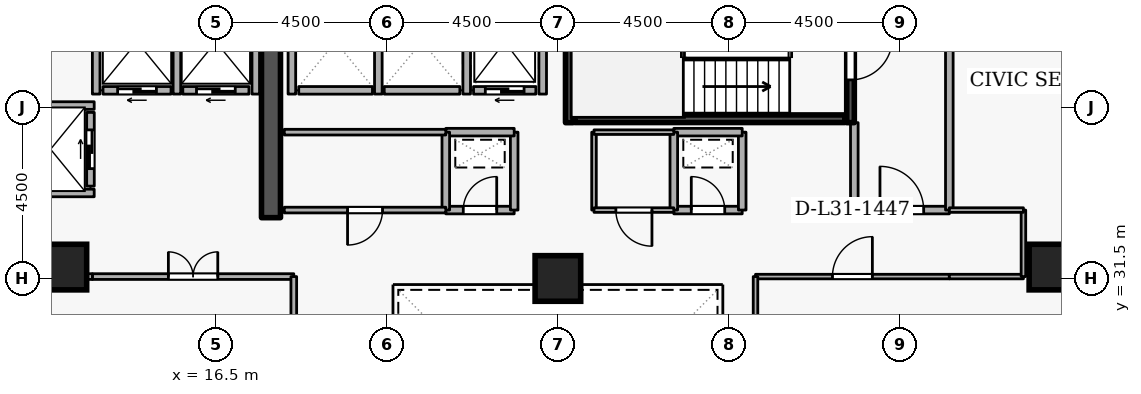
"""IFC4 building model, lengths in metres.
Left out: names, types, materials, properties, quantities, classifications, styles, units other than length and angle.
Written with IfcOpenShell. Run it as: python <this file> out.ifc"""

import sys

from ifc_helpers import new_model, si_unit, direction, frame, frame_2d, origin, origin_2d, place, context, subcontext, project, spatial, rectangle, extrude, element, fill, save


model = new_model("IFC4")
c1 = context("Model", 3, precision=1e-05, world=origin(), true_north=direction((0.0, 1.0)))
c2 = subcontext(c1, "Body", "Model", "MODEL_VIEW")
j1 = project(units=[si_unit("LENGTHUNIT", "METRE"), si_unit("PLANEANGLEUNIT", "RADIAN")], contexts=[c1])
p1 = place(None, origin())
s1 = spatial("IfcSite", under=j1, at=p1, CompositionType="ELEMENT")
p2 = place(p1, origin())
s2 = spatial("IfcBuilding", under=s1, at=p2, CompositionType="ELEMENT")
p3 = place(p2, frame((0.0, 0.0, 119.7)))
s3 = spatial("IfcBuildingStorey", under=s2, at=p3, CompositionType="ELEMENT", Elevation=119.7)
p4 = place(p3, frame((17.95, 33.1, 0.0), z_axis=(0.0, 0.0, 1.0), x_axis=(0.0, 1.0, 0.0)))
e1 = element("IfcWall", 1, at=p4, inside=s3, PredefinedType="SHEAR", context=c2, shape_type="SweptSolid", body=[
    extrude(rectangle(XDim=5.8, YDim=0.5, at=frame_2d((2.9, 0.0))), origin(), (0.0, 0.0, 1.0), 3.6),
])
for number, where, z_axis, x_axis in (
    (2, (12.5, 31.8, 0.0), (0.0, 0.0, 1.0), (1.0, 0.0, 0.0)),
    (3, (38.5, 31.8, 0.0), (0.0, 0.0, 1.0), (1.0, 0.0, 0.0)),
    (4, (25.5, 31.5, 0.0), (0.0, 0.0, 1.0), (1.0, 0.0, 0.0)),
):
    element("IfcColumn", number, at=place(p3, frame(where, z_axis=z_axis, x_axis=x_axis)), inside=s3, PredefinedType="COLUMN", context=c2, shape_type="SweptSolid", body=[
        extrude(rectangle(XDim=1.2, YDim=1.2, at=origin_2d()), origin(), (0.0, 0.0, 1.0), 3.6),
    ])
p5 = place(p3, frame((24.92, 36.45, 0.0), z_axis=(0.0, 0.0, 1.0), x_axis=(-1.0, 0.0, 0.0)))
e5 = element("IfcWall", 5, at=p5, inside=s3, PredefinedType="STANDARD", context=c2, shape_type="SweptSolid", body=[
    extrude(rectangle(XDim=1.64, YDim=0.2, at=frame_2d((0.82, 0.0))), origin(), (0.0, 0.0, 1.0), 3.32),
])
p6 = place(p5, frame((0.31, 0.0, 0.0)))
e6 = element("IfcOpeningElement", 6, at=p6, cuts=e5, PredefinedType="OPENING", context=c2, shape_type="SweptSolid", body=[
    extrude(rectangle(XDim=1.02, YDim=2.06, at=frame_2d((0.51, 1.03))), frame((0.0, 0.11, 0.0), z_axis=(0.0, -1.0, 0.0), x_axis=(1.0, 0.0, 0.0)), (0.0, 0.0, 1.0), 0.22),
])
p7 = place(p3, frame((22.92, 36.45, 0.0), z_axis=(0.0, 0.0, 1.0), x_axis=(-1.0, 0.0, 0.0)))
e7 = element("IfcWall", 7, at=p7, inside=s3, PredefinedType="STANDARD", context=c2, shape_type="SweptSolid", body=[
    extrude(rectangle(XDim=1.99, YDim=0.2, at=frame_2d((0.995, 0.0))), origin(), (0.0, 0.0, 1.0), 3.32),
])
p8 = place(p3, frame((20.62, 36.45, 0.0), z_axis=(0.0, 0.0, 1.0), x_axis=(-1.0, 0.0, 0.0)))
e8 = element("IfcWall", 8, at=p8, inside=s3, PredefinedType="STANDARD", context=c2, shape_type="SweptSolid", body=[
    extrude(rectangle(XDim=1.94, YDim=0.2, at=frame_2d((0.97, 0.0))), origin(), (0.0, 0.0, 1.0), 3.32),
])
p9 = place(p3, frame((17.37, 36.45, 0.0), z_axis=(0.0, 0.0, 1.0), x_axis=(-1.0, 0.0, 0.0)))
e9 = element("IfcWall", 9, at=p9, inside=s3, PredefinedType="STANDARD", context=c2, shape_type="SweptSolid", body=[
    extrude(rectangle(XDim=1.74, YDim=0.2, at=frame_2d((0.87, 0.0))), origin(), (0.0, 0.0, 1.0), 3.32),
])
p10 = place(p9, frame((0.36, 0.0, 0.0)))
e10 = element("IfcOpeningElement", 10, at=p10, cuts=e9, PredefinedType="OPENING", context=c2, shape_type="SweptSolid", body=[
    extrude(rectangle(XDim=1.02, YDim=2.06, at=frame_2d((0.51, 1.03))), frame((0.0, 0.11, 0.0), z_axis=(0.0, -1.0, 0.0), x_axis=(1.0, 0.0, 0.0)), (0.0, 0.0, 1.0), 0.22),
])
p11 = place(p3, frame((15.32, 36.45, 0.0), z_axis=(0.0, 0.0, 1.0), x_axis=(-1.0, 0.0, 0.0)))
e11 = element("IfcWall", 11, at=p11, inside=s3, PredefinedType="STANDARD", context=c2, shape_type="SweptSolid", body=[
    extrude(rectangle(XDim=1.79, YDim=0.2, at=frame_2d((0.895, 0.0))), origin(), (0.0, 0.0, 1.0), 3.32),
])
p12 = place(p11, frame((0.385, 0.0, 0.0)))
e12 = element("IfcOpeningElement", 12, at=p12, cuts=e11, PredefinedType="OPENING", context=c2, shape_type="SweptSolid", body=[
    extrude(rectangle(XDim=1.02, YDim=2.06, at=frame_2d((0.51, 1.03))), frame((0.0, 0.11, 0.0), z_axis=(0.0, -1.0, 0.0), x_axis=(1.0, 0.0, 0.0)), (0.0, 0.0, 1.0), 0.22),
])
p13 = place(p3, frame((13.2, 33.93, 0.0), z_axis=(0.0, 0.0, 1.0), x_axis=(0.0, 1.0, 0.0)))
e13 = element("IfcWall", 13, at=p13, inside=s3, PredefinedType="STANDARD", context=c2, shape_type="SweptSolid", body=[
    extrude(rectangle(XDim=1.94, YDim=0.2, at=frame_2d((0.97, 0.0))), origin(), (0.0, 0.0, 1.0), 3.32),
])
p14 = place(p13, frame((0.46, 0.0, 0.0)))
e14 = element("IfcOpeningElement", 14, at=p14, cuts=e13, PredefinedType="OPENING", context=c2, shape_type="SweptSolid", body=[
    extrude(rectangle(XDim=1.02, YDim=2.06, at=frame_2d((0.51, 1.03))), frame((0.0, 0.11, 0.0), z_axis=(0.0, -1.0, 0.0), x_axis=(1.0, 0.0, 0.0)), (0.0, 0.0, 1.0), 0.22),
])
for number, where, z_axis, x_axis in (
    (15, (25.1, 36.352, 0.0), (0.0, 0.0, 1.0), (0.0, 1.0, 0.0)),
    (16, (23.1, 36.352, 0.0), (0.0, 0.0, 1.0), (0.0, 1.0, 0.0)),
    (17, (20.775, 36.352, 0.0), (0.0, 0.0, 1.0), (0.0, 1.0, 0.0)),
    (18, (18.5, 36.352, 0.0), (0.0, 0.0, 1.0), (0.0, 1.0, 0.0)),
):
    element("IfcWall", number, at=place(p3, frame(where, z_axis=z_axis, x_axis=x_axis)), inside=s3, PredefinedType="STANDARD", context=c2, shape_type="SweptSolid", body=[
        extrude(rectangle(XDim=2.536, YDim=0.2, at=frame_2d((1.268, 0.0))), origin(), (0.0, 0.0, 1.0), 3.32),
    ])
p15 = place(p3, frame((17.55, 36.352, 0.0), z_axis=(0.0, 0.0, 1.0), x_axis=(0.0, 1.0, 0.0)))
e19 = element("IfcWall", 19, at=p15, inside=s3, PredefinedType="STANDARD", context=c2, shape_type="SweptSolid", body=[
    extrude(rectangle(XDim=2.636, YDim=0.2, at=frame_2d((1.318, 0.0))), origin(), (0.0, 0.0, 1.0), 2.525),
])
for number, where, z_axis, x_axis in (
    (20, (15.475, 36.352, 0.0), (0.0, 0.0, 1.0), (0.0, 1.0, 0.0)),
    (21, (13.35, 36.352, 0.0), (0.0, 0.0, 1.0), (0.0, 1.0, 0.0)),
):
    element("IfcWall", number, at=place(p3, frame(where, z_axis=z_axis, x_axis=x_axis)), inside=s3, PredefinedType="STANDARD", context=c2, shape_type="SweptSolid", body=[
        extrude(rectangle(XDim=2.636, YDim=0.2, at=frame_2d((1.318, 0.0))), origin(), (0.0, 0.0, 1.0), 3.32),
    ])
for number, where, z_axis, x_axis in (
    (22, (11.002, 36.05, 0.0), (0.0, 0.0, 1.0), (1.0, 0.0, 0.0)),
    (23, (11.002, 33.75, 0.0), (0.0, 0.0, 1.0), (1.0, 0.0, 0.0)),
):
    element("IfcWall", number, at=place(p3, frame(where, z_axis=z_axis, x_axis=x_axis)), inside=s3, PredefinedType="STANDARD", context=c2, shape_type="SweptSolid", body=[
        extrude(rectangle(XDim=2.296, YDim=0.2, at=frame_2d((1.148, 0.0))), origin(), (0.0, 0.0, 1.0), 3.32),
    ])
p16 = place(p3, frame((33.2, 38.95, 0.0), z_axis=(0.0, 0.0, 1.0), x_axis=(0.0, -1.0, 0.0)))
e24 = element("IfcWall", 24, at=p16, inside=s3, PredefinedType="SHEAR", context=c2, shape_type="SweptSolid", body=[
    extrude(rectangle(XDim=3.35, YDim=0.2, at=frame_2d((1.675, 0.0))), origin(), (0.0, 0.0, 1.0), 3.6),
])
p17 = place(p16, frame((1.125, 0.0, 0.0)))
e25 = element("IfcOpeningElement", 25, at=p17, cuts=e24, PredefinedType="OPENING", context=c2, shape_type="SweptSolid", body=[
    extrude(rectangle(XDim=1.1, YDim=2.1, at=frame_2d((0.55, 1.05))), frame((0.0, 0.11, 0.0), z_axis=(0.0, -1.0, 0.0), x_axis=(1.0, 0.0, 0.0)), (0.0, 0.0, 1.0), 0.22),
])
p18 = place(p3, frame((25.8, 35.6, 0.0), z_axis=(0.0, 0.0, 1.0), x_axis=(0.0, 1.0, 0.0)))
e26 = element("IfcWall", 26, at=p18, inside=s3, PredefinedType="SHEAR", context=c2, shape_type="SweptSolid", body=[
    extrude(rectangle(XDim=3.35, YDim=0.2, at=frame_2d((1.675, 0.0))), origin(), (0.0, 0.0, 1.0), 3.6),
])
p19 = place(p3, frame((25.95, 35.703, 0.0), z_axis=(0.0, 0.0, 1.0), x_axis=(1.0, 0.0, 0.0)))
e27 = element("IfcWall", 27, at=p19, inside=s3, PredefinedType="SHEAR", context=c2, shape_type="SweptSolid", body=[
    extrude(rectangle(XDim=7.1, YDim=0.2, at=frame_2d((3.55, 0.0))), origin(), (0.0, 0.0, 1.0), 3.6),
])
p20 = place(p3, frame((33.3, 33.3, 0.0), z_axis=(0.0, 0.0, 1.0), x_axis=(1.0, 0.0, 0.0)))
e28 = element("IfcWall", 28, at=p20, inside=s3, PredefinedType="STANDARD", context=c2, shape_type="SweptSolid", body=[
    extrude(rectangle(XDim=2.5, YDim=0.2, at=frame_2d((1.25, 0.0))), origin(), (0.0, 0.0, 1.0), 3.32),
])
p21 = place(p20, frame((0.675, 0.0, 0.0)))
e29 = element("IfcOpeningElement", 29, at=p21, cuts=e28, PredefinedType="OPENING", context=c2, shape_type="SweptSolid", body=[
    extrude(rectangle(XDim=1.15, YDim=2.1, at=frame_2d((0.575, 1.05))), frame((0.0, 0.11, 0.0), z_axis=(0.0, -1.0, 0.0), x_axis=(1.0, 0.0, 0.0)), (0.0, 0.0, 1.0), 0.22),
])
p22 = place(p3, frame((35.8, 33.3, 0.0), z_axis=(0.0, 0.0, 1.0), x_axis=(0.0, 1.0, 0.0)))
e30 = element("IfcWall", 30, at=p22, inside=s3, PredefinedType="STANDARD", context=c2, shape_type="SweptSolid", body=[
    extrude(rectangle(XDim=5.7, YDim=0.2, at=frame_2d((2.85, 0.0))), origin(), (0.0, 0.0, 1.0), 3.32),
])
p23 = place(p3, frame((33.3, 35.6, 0.0), z_axis=(0.0, 0.0, 1.0), x_axis=(0.0, -1.0, 0.0)))
e31 = element("IfcWall", 31, at=p23, inside=s3, PredefinedType="STANDARD", context=c2, shape_type="SweptSolid", body=[
    extrude(rectangle(XDim=2.3, YDim=0.2, at=frame_2d((1.15, 0.0))), origin(), (0.0, 0.0, 1.0), 2.525),
])
p24 = place(p3, frame((22.55, 33.3, 0.0), z_axis=(0.0, 0.0, 1.0), x_axis=(1.0, 0.0, 0.0)))
e32 = element("IfcWall", 32, at=p24, inside=s3, PredefinedType="STANDARD", context=c2, shape_type="SweptSolid", body=[
    extrude(rectangle(XDim=1.8, YDim=0.2, at=frame_2d((0.9, 0.0))), origin(), (0.0, 0.0, 1.0), 3.32),
])
p25 = place(p24, frame((0.46, 0.0, 0.0)))
e33 = element("IfcOpeningElement", 33, at=p25, cuts=e32, PredefinedType="OPENING", context=c2, shape_type="SweptSolid", body=[
    extrude(rectangle(XDim=0.88, YDim=2.04, at=frame_2d((0.44, 1.02))), frame((0.0, 0.11, 0.0), z_axis=(0.0, -1.0, 0.0), x_axis=(1.0, 0.0, 0.0)), (0.0, 0.0, 1.0), 0.22),
])
p26 = place(p3, frame((24.35, 33.3, 0.0), z_axis=(0.0, 0.0, 1.0), x_axis=(0.0, 1.0, 0.0)))
e34 = element("IfcWall", 34, at=p26, inside=s3, PredefinedType="STANDARD", context=c2, shape_type="SweptSolid", body=[
    extrude(rectangle(XDim=2.05, YDim=0.2, at=frame_2d((1.025, 0.0))), origin(), (0.0, 0.0, 1.0), 3.32),
])
p27 = place(p3, frame((24.35, 35.35, 0.0), z_axis=(0.0, 0.0, 1.0), x_axis=(-1.0, 0.0, 0.0)))
e35 = element("IfcWall", 35, at=p27, inside=s3, PredefinedType="STANDARD", context=c2, shape_type="SweptSolid", body=[
    extrude(rectangle(XDim=1.8, YDim=0.2, at=frame_2d((0.9, 0.0))), origin(), (0.0, 0.0, 1.0), 3.32),
])
p28 = place(p3, frame((22.55, 35.35, 0.0), z_axis=(0.0, 0.0, 1.0), x_axis=(0.0, -1.0, 0.0)))
e36 = element("IfcWall", 36, at=p28, inside=s3, PredefinedType="STANDARD", context=c2, shape_type="SweptSolid", body=[
    extrude(rectangle(XDim=2.05, YDim=0.2, at=frame_2d((1.025, 0.0))), origin(), (0.0, 0.0, 1.0), 3.32),
])
p29 = place(p3, frame((28.55, 33.3, 0.0), z_axis=(0.0, 0.0, 1.0), x_axis=(1.0, 0.0, 0.0)))
e37 = element("IfcWall", 37, at=p29, inside=s3, PredefinedType="STANDARD", context=c2, shape_type="SweptSolid", body=[
    extrude(rectangle(XDim=1.8, YDim=0.2, at=frame_2d((0.9, 0.0))), origin(), (0.0, 0.0, 1.0), 3.32),
])
p30 = place(p29, frame((0.46, 0.0, 0.0)))
e38 = element("IfcOpeningElement", 38, at=p30, cuts=e37, PredefinedType="OPENING", context=c2, shape_type="SweptSolid", body=[
    extrude(rectangle(XDim=0.88, YDim=2.04, at=frame_2d((0.44, 1.02))), frame((0.0, 0.11, 0.0), z_axis=(0.0, -1.0, 0.0), x_axis=(1.0, 0.0, 0.0)), (0.0, 0.0, 1.0), 0.22),
])
p31 = place(p3, frame((30.35, 33.3, 0.0), z_axis=(0.0, 0.0, 1.0), x_axis=(0.0, 1.0, 0.0)))
e39 = element("IfcWall", 39, at=p31, inside=s3, PredefinedType="STANDARD", context=c2, shape_type="SweptSolid", body=[
    extrude(rectangle(XDim=2.05, YDim=0.2, at=frame_2d((1.025, 0.0))), origin(), (0.0, 0.0, 1.0), 3.32),
])
p32 = place(p3, frame((30.35, 35.35, 0.0), z_axis=(0.0, 0.0, 1.0), x_axis=(-1.0, 0.0, 0.0)))
e40 = element("IfcWall", 40, at=p32, inside=s3, PredefinedType="STANDARD", context=c2, shape_type="SweptSolid", body=[
    extrude(rectangle(XDim=1.8, YDim=0.2, at=frame_2d((0.9, 0.0))), origin(), (0.0, 0.0, 1.0), 3.32),
])
p33 = place(p3, frame((28.55, 35.35, 0.0), z_axis=(0.0, 0.0, 1.0), x_axis=(0.0, -1.0, 0.0)))
e41 = element("IfcWall", 41, at=p33, inside=s3, PredefinedType="STANDARD", context=c2, shape_type="SweptSolid", body=[
    extrude(rectangle(XDim=2.05, YDim=0.2, at=frame_2d((1.025, 0.0))), origin(), (0.0, 0.0, 1.0), 3.32),
])
p34 = place(p3, frame((18.3, 35.35, 0.0), z_axis=(0.0, 0.0, 1.0), x_axis=(1.0, 0.0, 0.0)))
e42 = element("IfcWall", 42, at=p34, inside=s3, PredefinedType="PARTITIONING", context=c2, shape_type="SweptSolid", body=[
    extrude(rectangle(XDim=4.25, YDim=0.15, at=frame_2d((2.125, 0.0))), origin(), (0.0, 0.0, 1.0), 3.32),
])
p35 = place(p3, frame((22.55, 33.3, 0.0), z_axis=(0.0, 0.0, 1.0), x_axis=(-1.0, 0.0, 0.0)))
e43 = element("IfcWall", 43, at=p35, inside=s3, PredefinedType="PARTITIONING", context=c2, shape_type="SweptSolid", body=[
    extrude(rectangle(XDim=4.25, YDim=0.15, at=frame_2d((2.125, 0.0))), origin(), (0.0, 0.0, 1.0), 3.32),
])
p36 = place(p35, frame((1.665, 0.0, 0.0)))
e44 = element("IfcOpeningElement", 44, at=p36, cuts=e43, PredefinedType="OPENING", context=c2, shape_type="SweptSolid", body=[
    extrude(rectangle(XDim=0.92, YDim=2.08, at=frame_2d((0.46, 1.04))), frame((0.0, 0.085, 0.0), z_axis=(0.0, -1.0, 0.0), x_axis=(1.0, 0.0, 0.0)), (0.0, 0.0, 1.0), 0.17),
])
p37 = place(p3, frame((26.45, 33.3, 0.0), z_axis=(0.0, 0.0, 1.0), x_axis=(0.0, 1.0, 0.0)))
e45 = element("IfcWall", 45, at=p37, inside=s3, PredefinedType="PARTITIONING", context=c2, shape_type="SweptSolid", body=[
    extrude(rectangle(XDim=2.05, YDim=0.12, at=frame_2d((1.025, 0.0))), origin(), (0.0, 0.0, 1.0), 3.32),
])
p38 = place(p3, frame((26.45, 35.35, 0.0), z_axis=(0.0, 0.0, 1.0), x_axis=(1.0, 0.0, 0.0)))
e46 = element("IfcWall", 46, at=p38, inside=s3, PredefinedType="PARTITIONING", context=c2, shape_type="SweptSolid", body=[
    extrude(rectangle(XDim=2.1, YDim=0.12, at=frame_2d((1.05, 0.0))), origin(), (0.0, 0.0, 1.0), 3.32),
])
p39 = place(p3, frame((28.55, 33.3, 0.0), z_axis=(0.0, 0.0, 1.0), x_axis=(-1.0, 0.0, 0.0)))
e47 = element("IfcWall", 47, at=p39, inside=s3, PredefinedType="PARTITIONING", context=c2, shape_type="SweptSolid", body=[
    extrude(rectangle(XDim=2.1, YDim=0.12, at=frame_2d((1.05, 0.0))), origin(), (0.0, 0.0, 1.0), 3.32),
])
p40 = place(p39, frame((0.575, 0.0, 0.0)))
e48 = element("IfcOpeningElement", 48, at=p40, cuts=e47, PredefinedType="OPENING", context=c2, shape_type="SweptSolid", body=[
    extrude(rectangle(XDim=0.95, YDim=2.1, at=frame_2d((0.475, 1.05))), frame((0.0, 0.07, 0.0), z_axis=(0.0, -1.0, 0.0), x_axis=(1.0, 0.0, 0.0)), (0.0, 0.0, 1.0), 0.14),
])
p41 = place(p3, frame((13.25, 31.55, 0.0), z_axis=(0.0, 0.0, 1.0), x_axis=(1.0, 0.0, 0.0)))
e49 = element("IfcWall", 49, at=p41, inside=s3, PredefinedType="PARTITIONING", context=c2, shape_type="SweptSolid", body=[
    extrude(rectangle(XDim=5.3, YDim=0.15, at=frame_2d((2.65, 0.0))), origin(), (0.0, 0.0, 1.0), 3.32),
])
p42 = place(p41, frame((2.0, 0.0, 0.0)))
e50 = element("IfcOpeningElement", 50, at=p42, cuts=e49, PredefinedType="OPENING", context=c2, shape_type="SweptSolid", body=[
    extrude(rectangle(XDim=1.3, YDim=2.12, at=frame_2d((0.65, 1.06))), frame((0.0, 0.085, 0.0), z_axis=(0.0, -1.0, 0.0), x_axis=(1.0, 0.0, 0.0)), (0.0, 0.0, 1.0), 0.17),
])
p43 = place(p3, frame((18.55, 31.55, 0.0), z_axis=(0.0, 0.0, 1.0), x_axis=(0.0, -1.0, 0.0)))
e51 = element("IfcWall", 51, at=p43, inside=s3, PredefinedType="PARTITIONING", context=c2, shape_type="SweptSolid", body=[
    extrude(rectangle(XDim=4.55, YDim=0.15, at=frame_2d((2.275, 0.0))), origin(), (0.0, 0.0, 1.0), 3.32),
])
p44 = place(p3, frame((10.9, 31.55, 0.0), z_axis=(0.0, 0.0, 1.0), x_axis=(1.0, 0.0, 0.0)))
e52 = element("IfcWall", 52, at=p44, inside=s3, PredefinedType="PARTITIONING", context=c2, shape_type="SweptSolid", body=[
    extrude(rectangle(XDim=2.35, YDim=0.15, at=frame_2d((1.175, 0.0))), origin(), (0.0, 0.0, 1.0), 3.32),
])
p45 = place(p3, frame((30.7, 31.55, 0.0), z_axis=(0.0, 0.0, 1.0), x_axis=(1.0, 0.0, 0.0)))
e53 = element("IfcWall", 53, at=p45, inside=s3, PredefinedType="PARTITIONING", context=c2, shape_type="SweptSolid", body=[
    extrude(rectangle(XDim=5.1, YDim=0.12, at=frame_2d((2.55, 0.0))), origin(), (0.0, 0.0, 1.0), 3.32),
])
p46 = place(p45, frame((2.025, 0.0, 0.0)))
e54 = element("IfcOpeningElement", 54, at=p46, cuts=e53, PredefinedType="OPENING", context=c2, shape_type="SweptSolid", body=[
    extrude(rectangle(XDim=1.05, YDim=2.1, at=frame_2d((0.525, 1.05))), frame((0.0, 0.07, 0.0), z_axis=(0.0, -1.0, 0.0), x_axis=(1.0, 0.0, 0.0)), (0.0, 0.0, 1.0), 0.14),
])
p47 = place(p3, frame((35.8, 31.55, 0.0), z_axis=(0.0, 0.0, 1.0), x_axis=(1.0, 0.0, 0.0)))
e55 = element("IfcWall", 55, at=p47, inside=s3, PredefinedType="PARTITIONING", context=c2, shape_type="SweptSolid", body=[
    extrude(rectangle(XDim=1.95, YDim=0.12, at=frame_2d((0.975, 0.0))), origin(), (0.0, 0.0, 1.0), 3.32),
])
p48 = place(p3, frame((37.75, 31.55, 0.0), z_axis=(0.0, 0.0, 1.0), x_axis=(0.0, 1.0, 0.0)))
e56 = element("IfcWall", 56, at=p48, inside=s3, PredefinedType="PARTITIONING", context=c2, shape_type="SweptSolid", body=[
    extrude(rectangle(XDim=1.75, YDim=0.12, at=frame_2d((0.875, 0.0))), origin(), (0.0, 0.0, 1.0), 3.32),
])
p49 = place(p3, frame((37.75, 33.3, 0.0), z_axis=(0.0, 0.0, 1.0), x_axis=(-1.0, 0.0, 0.0)))
e57 = element("IfcWall", 57, at=p49, inside=s3, PredefinedType="PARTITIONING", context=c2, shape_type="SweptSolid", body=[
    extrude(rectangle(XDim=1.95, YDim=0.12, at=frame_2d((0.975, 0.0))), origin(), (0.0, 0.0, 1.0), 3.32),
])
p50 = place(p3, frame((30.7, 27.0, 0.0), z_axis=(0.0, 0.0, 1.0), x_axis=(0.0, 1.0, 0.0)))
e58 = element("IfcWall", 58, at=p50, inside=s3, PredefinedType="PARTITIONING", context=c2, shape_type="SweptSolid", body=[
    extrude(rectangle(XDim=4.55, YDim=0.12, at=frame_2d((2.275, 0.0))), origin(), (0.0, 0.0, 1.0), 3.32),
])
p51 = place(p6, origin())
e59 = element("IfcDoor", 59, at=p51, inside=s3, OperationType="SLIDING_TO_LEFT", PredefinedType="DOOR", context=c2, shape_type="SweptSolid", body=[
    extrude(rectangle(XDim=1.02, YDim=2.06, at=frame_2d((0.51, 1.03))), frame((0.0, 0.025, 0.0), z_axis=(0.0, -1.0, 0.0), x_axis=(1.0, 0.0, 0.0)), (0.0, 0.0, 1.0), 0.05),
])
fill(e6, e59)
p52 = place(p10, origin())
e60 = element("IfcDoor", 60, at=p52, inside=s3, OperationType="SLIDING_TO_LEFT", PredefinedType="DOOR", context=c2, shape_type="SweptSolid", body=[
    extrude(rectangle(XDim=1.02, YDim=2.06, at=frame_2d((0.51, 1.03))), frame((0.0, 0.025, 0.0), z_axis=(0.0, -1.0, 0.0), x_axis=(1.0, 0.0, 0.0)), (0.0, 0.0, 1.0), 0.05),
])
fill(e10, e60)
p53 = place(p12, origin())
e61 = element("IfcDoor", 61, at=p53, inside=s3, OperationType="SLIDING_TO_LEFT", PredefinedType="DOOR", context=c2, shape_type="SweptSolid", body=[
    extrude(rectangle(XDim=1.02, YDim=2.06, at=frame_2d((0.51, 1.03))), frame((0.0, 0.025, 0.0), z_axis=(0.0, -1.0, 0.0), x_axis=(1.0, 0.0, 0.0)), (0.0, 0.0, 1.0), 0.05),
])
fill(e12, e61)
p54 = place(p14, origin())
e62 = element("IfcDoor", 62, at=p54, inside=s3, OperationType="SLIDING_TO_LEFT", PredefinedType="DOOR", context=c2, shape_type="SweptSolid", body=[
    extrude(rectangle(XDim=1.02, YDim=2.06, at=frame_2d((0.51, 1.03))), frame((0.0, 0.025, 0.0), z_axis=(0.0, -1.0, 0.0), x_axis=(1.0, 0.0, 0.0)), (0.0, 0.0, 1.0), 0.05),
])
fill(e14, e62)
p55 = place(p17, origin())
e63 = element("IfcDoor", 63, at=p55, inside=s3, OperationType="SINGLE_SWING_LEFT", PredefinedType="DOOR", context=c2, shape_type="SweptSolid", body=[
    extrude(rectangle(XDim=1.1, YDim=2.1, at=frame_2d((0.55, 1.05))), frame((0.0, 0.025, 0.0), z_axis=(0.0, -1.0, 0.0), x_axis=(1.0, 0.0, 0.0)), (0.0, 0.0, 1.0), 0.05),
])
fill(e25, e63)
p56 = place(p21, origin())
e64 = element("IfcDoor", 64, at=p56, inside=s3, OperationType="SINGLE_SWING_LEFT", PredefinedType="DOOR", context=c2, shape_type="SweptSolid", body=[
    extrude(rectangle(XDim=1.15, YDim=2.1, at=frame_2d((0.575, 1.05))), frame((0.0, 0.025, 0.0), z_axis=(0.0, -1.0, 0.0), x_axis=(1.0, 0.0, 0.0)), (0.0, 0.0, 1.0), 0.05),
])
fill(e29, e64)
p57 = place(p25, origin())
e65 = element("IfcDoor", 65, at=p57, inside=s3, OperationType="SINGLE_SWING_RIGHT", PredefinedType="DOOR", context=c2, shape_type="SweptSolid", body=[
    extrude(rectangle(XDim=0.88, YDim=2.04, at=frame_2d((0.44, 1.02))), frame((0.0, 0.025, 0.0), z_axis=(0.0, -1.0, 0.0), x_axis=(1.0, 0.0, 0.0)), (0.0, 0.0, 1.0), 0.05),
])
fill(e33, e65)
p58 = place(p30, origin())
e66 = element("IfcDoor", 66, at=p58, inside=s3, OperationType="SINGLE_SWING_LEFT", PredefinedType="DOOR", context=c2, shape_type="SweptSolid", body=[
    extrude(rectangle(XDim=0.88, YDim=2.04, at=frame_2d((0.44, 1.02))), frame((0.0, 0.025, 0.0), z_axis=(0.0, -1.0, 0.0), x_axis=(1.0, 0.0, 0.0)), (0.0, 0.0, 1.0), 0.05),
])
fill(e38, e66)
p59 = place(p36, origin())
e67 = element("IfcDoor", 67, at=p59, inside=s3, OperationType="SINGLE_SWING_RIGHT", PredefinedType="DOOR", context=c2, shape_type="SweptSolid", body=[
    extrude(rectangle(XDim=0.92, YDim=2.08, at=frame_2d((0.46, 1.04))), frame((0.0, 0.025, 0.0), z_axis=(0.0, -1.0, 0.0), x_axis=(1.0, 0.0, 0.0)), (0.0, 0.0, 1.0), 0.05),
])
fill(e44, e67)
p60 = place(p40, origin())
e68 = element("IfcDoor", 68, at=p60, inside=s3, OperationType="SINGLE_SWING_LEFT", PredefinedType="DOOR", context=c2, shape_type="SweptSolid", body=[
    extrude(rectangle(XDim=0.95, YDim=2.1, at=frame_2d((0.475, 1.05))), frame((0.0, 0.025, 0.0), z_axis=(0.0, -1.0, 0.0), x_axis=(1.0, 0.0, 0.0)), (0.0, 0.0, 1.0), 0.05),
])
fill(e48, e68)
p61 = place(p42, origin())
e69 = element("IfcDoor", 69, at=p61, inside=s3, OperationType="DOUBLE_DOOR_SINGLE_SWING", PredefinedType="DOOR", context=c2, shape_type="SweptSolid", body=[
    extrude(rectangle(XDim=1.3, YDim=2.12, at=frame_2d((0.65, 1.06))), frame((0.0, 0.025, 0.0), z_axis=(0.0, -1.0, 0.0), x_axis=(1.0, 0.0, 0.0)), (0.0, 0.0, 1.0), 0.05),
])
fill(e50, e69)
p62 = place(p46, origin())
e70 = element("IfcDoor", 70, at=p62, inside=s3, OperationType="SINGLE_SWING_RIGHT", PredefinedType="DOOR", context=c2, shape_type="SweptSolid", body=[
    extrude(rectangle(XDim=1.05, YDim=2.1, at=frame_2d((0.525, 1.05))), frame((0.0, 0.025, 0.0), z_axis=(0.0, -1.0, 0.0), x_axis=(1.0, 0.0, 0.0)), (0.0, 0.0, 1.0), 0.05),
])
fill(e54, e70)
save(model, sys.argv[1])
